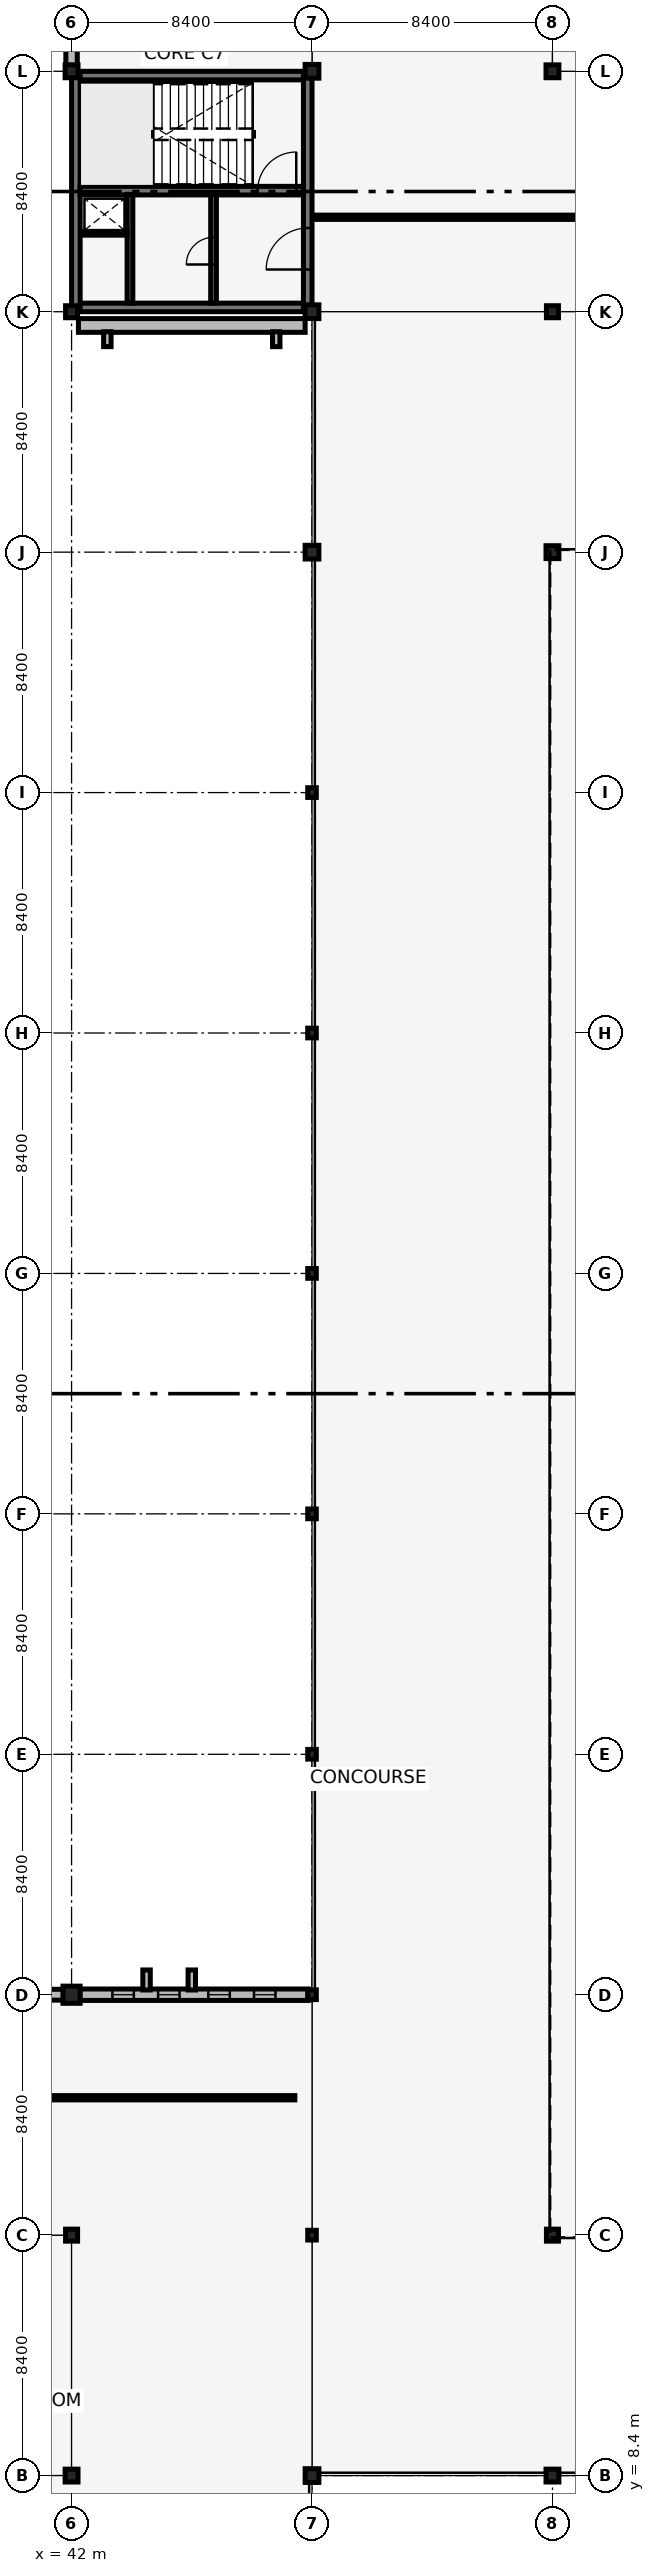
"""IFC4 building model, lengths in metres.
Left out: names, types, materials, properties, quantities, classifications, styles, units other than length and angle.
Written with IfcOpenShell. Run it as: python <this file> out.ifc"""

import sys

from ifc_helpers import new_model, si_unit, direction, frame, frame_2d, origin, origin_2d, place, context, subcontext, project, spatial, rectangle, i_section, extrude, element, fill, save


model = new_model("IFC4")
c1 = context("Model", 3, precision=1e-05, world=origin(), true_north=direction((0.0, 1.0)))
c2 = subcontext(c1, "Body", "Model", "MODEL_VIEW")
j1 = project(units=[si_unit("LENGTHUNIT", "METRE"), si_unit("PLANEANGLEUNIT", "RADIAN")], contexts=[c1])
p1 = place(None, origin())
s1 = spatial("IfcSite", under=j1, at=p1, CompositionType="ELEMENT")
p2 = place(p1, origin())
s2 = spatial("IfcBuilding", under=s1, at=p2, CompositionType="ELEMENT")
p3 = place(p2, frame((0.0, 0.0, 5.44)))
s3 = spatial("IfcBuildingStorey", under=s2, at=p3, CompositionType="ELEMENT", Elevation=5.44)
for number, where, z_axis, x_axis in (
    (1, (42.15, 84.15, 0.0), (0.0, 0.0, 1.0), (1.0, 0.0, 0.0)),
    (2, (42.15, 92.25, 0.0), (0.0, 0.0, 1.0), (1.0, 0.0, 0.0)),
    (3, (42.15, 84.15, 0.0), (0.0, 0.0, 1.0), (0.0, 1.0, 0.0)),
):
    element("IfcWall", number, at=place(p3, frame(where, z_axis=z_axis, x_axis=x_axis)), inside=s3, PredefinedType="SHEAR", context=c2, shape_type="SweptSolid", body=[
        extrude(rectangle(XDim=8.1, YDim=0.3, at=frame_2d((4.05, 0.0))), origin(), (0.0, 0.0, 1.0), 4.12),
    ])
p4 = place(p3, frame((50.25, 84.15, 0.0), z_axis=(0.0, 0.0, 1.0), x_axis=(0.0, 1.0, 0.0)))
e4 = element("IfcWall", 4, at=p4, inside=s3, PredefinedType="SHEAR", context=c2, shape_type="SweptSolid", body=[
    extrude(rectangle(XDim=8.1, YDim=0.3, at=frame_2d((4.05, 0.0))), origin(), (0.0, 0.0, 1.0), 4.12),
])
p5 = place(p4, frame((1.325, 0.0, 0.0)))
e5 = element("IfcOpeningElement", 5, at=p5, cuts=e4, PredefinedType="OPENING", context=c2, shape_type="SweptSolid", body=[
    extrude(rectangle(XDim=1.45, YDim=2.15, at=frame_2d((0.725, 1.075))), frame((0.0, 0.16, 0.0), z_axis=(0.0, -1.0, 0.0), x_axis=(1.0, 0.0, 0.0)), (0.0, 0.0, 1.0), 0.32),
])
p6 = place(p3, frame((42.3, 88.23, 0.0), z_axis=(0.0, 0.0, 1.0), x_axis=(1.0, 0.0, 0.0)))
e6 = element("IfcWall", 6, at=p6, inside=s3, PredefinedType="SHEAR", context=c2, shape_type="SweptSolid", body=[
    extrude(rectangle(XDim=7.8, YDim=0.3, at=frame_2d((3.9, 0.0))), origin(), (0.0, 0.0, 1.0), 4.12),
])
p7 = place(p6, frame((6.2, 0.0, 0.0)))
e7 = element("IfcOpeningElement", 7, at=p7, cuts=e6, PredefinedType="OPENING", context=c2, shape_type="SweptSolid", body=[
    extrude(rectangle(XDim=1.35, YDim=2.15, at=frame_2d((0.675, 1.075))), frame((0.0, 0.16, 0.0), z_axis=(0.0, -1.0, 0.0), x_axis=(1.0, 0.0, 0.0)), (0.0, 0.0, 1.0), 0.32),
])
p8 = place(p3, frame((42.0, 8.4, 0.0), z_axis=(0.0, 0.0, 1.0), x_axis=(1.0, 0.0, 0.0)))
e8 = element("IfcColumn", 8, at=p8, inside=s3, PredefinedType="COLUMN", context=c2, shape_type="SweptSolid", body=[
    extrude(rectangle(XDim=0.45, YDim=0.45, at=origin_2d()), origin(), (0.0, 0.0, 1.0), 4.12),
])
p9 = place(p3, frame((42.0, 16.8, 0.0), z_axis=(0.0, 0.0, 1.0), x_axis=(1.0, 0.0, 0.0)))
e9 = element("IfcColumn", 9, at=p9, inside=s3, PredefinedType="COLUMN", context=c2, shape_type="SweptSolid", body=[
    extrude(rectangle(XDim=0.42, YDim=0.42, at=origin_2d()), origin(), (0.0, 0.0, 1.0), 4.12),
])
p10 = place(p3, frame((42.0, 25.2, 0.0), z_axis=(0.0, 0.0, 1.0), x_axis=(1.0, 0.0, 0.0)))
e10 = element("IfcColumn", 10, at=p10, inside=s3, PredefinedType="COLUMN", context=c2, shape_type="SweptSolid", body=[
    extrude(rectangle(XDim=0.6, YDim=0.6, at=origin_2d()), origin(), (0.0, 0.0, 1.0), 4.12),
])
p11 = place(p3, frame((42.0, 84.0, 0.0), z_axis=(0.0, 0.0, 1.0), x_axis=(1.0, 0.0, 0.0)))
e11 = element("IfcColumn", 11, at=p11, inside=s3, PredefinedType="COLUMN", context=c2, shape_type="SweptSolid", body=[
    extrude(rectangle(XDim=0.42, YDim=0.42, at=origin_2d()), origin(), (0.0, 0.0, 1.0), 4.12),
])
p12 = place(p3, frame((42.0, 92.4, 0.0), z_axis=(0.0, 0.0, 1.0), x_axis=(1.0, 0.0, 0.0)))
e12 = element("IfcColumn", 12, at=p12, inside=s3, PredefinedType="COLUMN", context=c2, shape_type="SweptSolid", body=[
    extrude(rectangle(XDim=0.45, YDim=0.45, at=origin_2d()), origin(), (0.0, 0.0, 1.0), 4.12),
])
p13 = place(p3, frame((50.4, 8.4, 0.0), z_axis=(0.0, 0.0, 1.0), x_axis=(1.0, 0.0, 0.0)))
e13 = element("IfcColumn", 13, at=p13, inside=s3, PredefinedType="COLUMN", context=c2, shape_type="SweptSolid", body=[
    extrude(rectangle(XDim=0.48, YDim=0.48, at=origin_2d()), origin(), (0.0, 0.0, 1.0), 4.12),
])
for number, where, z_axis, x_axis in (
    (14, (50.4, 16.8, 0.0), (0.0, 0.0, 1.0), (1.0, 0.0, 0.0)),
    (15, (50.4, 25.2, 0.0), (0.0, 0.0, 1.0), (1.0, 0.0, 0.0)),
    (16, (50.4, 33.6, 0.0), (0.0, 0.0, 1.0), (1.0, 0.0, 0.0)),
    (17, (50.4, 42.0, 0.0), (0.0, 0.0, 1.0), (1.0, 0.0, 0.0)),
    (18, (50.4, 50.4, 0.0), (0.0, 0.0, 1.0), (1.0, 0.0, 0.0)),
    (19, (50.4, 58.8, 0.0), (0.0, 0.0, 1.0), (1.0, 0.0, 0.0)),
    (20, (50.4, 67.2, 0.0), (0.0, 0.0, 1.0), (1.0, 0.0, 0.0)),
):
    element("IfcColumn", number, at=place(p3, frame(where, z_axis=z_axis, x_axis=x_axis)), inside=s3, PredefinedType="COLUMN", context=c2, shape_type="SweptSolid", body=[
        extrude(i_section(OverallWidth=0.3, OverallDepth=0.34, WebThickness=0.012, FlangeThickness=0.021, FilletRadius=0.027, at=origin_2d()), origin(), (0.0, 0.0, 1.0), 4.12),
    ])
for number, where, z_axis, x_axis in (
    (21, (50.4, 75.6, 0.0), (0.0, 0.0, 1.0), (1.0, 0.0, 0.0)),
    (22, (50.4, 84.0, 0.0), (0.0, 0.0, 1.0), (1.0, 0.0, 0.0)),
    (23, (50.4, 92.4, 0.0), (0.0, 0.0, 1.0), (1.0, 0.0, 0.0)),
):
    element("IfcColumn", number, at=place(p3, frame(where, z_axis=z_axis, x_axis=x_axis)), inside=s3, PredefinedType="COLUMN", context=c2, shape_type="SweptSolid", body=[
        extrude(rectangle(XDim=0.48, YDim=0.48, at=origin_2d()), origin(), (0.0, 0.0, 1.0), 4.12),
    ])
p14 = place(p3, frame((58.8, 8.4, 0.0), z_axis=(0.0, 0.0, 1.0), x_axis=(1.0, 0.0, 0.0)))
e24 = element("IfcColumn", 24, at=p14, inside=s3, PredefinedType="COLUMN", context=c2, shape_type="SweptSolid", body=[
    extrude(rectangle(XDim=0.45, YDim=0.45, at=origin_2d()), origin(), (0.0, 0.0, 1.0), 4.12),
])
p15 = place(p3, frame((58.8, 16.8, 0.0), z_axis=(0.0, 0.0, 1.0), x_axis=(1.0, 0.0, 0.0)))
e25 = element("IfcColumn", 25, at=p15, inside=s3, PredefinedType="COLUMN", context=c2, shape_type="SweptSolid", body=[
    extrude(rectangle(XDim=0.42, YDim=0.42, at=origin_2d()), origin(), (0.0, 0.0, 1.0), 4.12),
])
p16 = place(p3, frame((58.8, 75.6, 0.0), z_axis=(0.0, 0.0, 1.0), x_axis=(1.0, 0.0, 0.0)))
e26 = element("IfcColumn", 26, at=p16, inside=s3, PredefinedType="COLUMN", context=c2, shape_type="SweptSolid", body=[
    extrude(rectangle(XDim=0.45, YDim=0.45, at=origin_2d()), origin(), (0.0, 0.0, 1.0), 4.12),
])
p17 = place(p3, frame((58.8, 84.0, 0.0), z_axis=(0.0, 0.0, 1.0), x_axis=(1.0, 0.0, 0.0)))
e27 = element("IfcColumn", 27, at=p17, inside=s3, PredefinedType="COLUMN", context=c2, shape_type="SweptSolid", body=[
    extrude(rectangle(XDim=0.42, YDim=0.42, at=origin_2d()), origin(), (0.0, 0.0, 1.0), 4.12),
])
p18 = place(p3, frame((58.8, 92.4, 0.0), z_axis=(0.0, 0.0, 1.0), x_axis=(1.0, 0.0, 0.0)))
e28 = element("IfcColumn", 28, at=p18, inside=s3, PredefinedType="COLUMN", context=c2, shape_type="SweptSolid", body=[
    extrude(rectangle(XDim=0.45, YDim=0.45, at=origin_2d()), origin(), (0.0, 0.0, 1.0), 4.12),
])
p19 = place(p3, frame((33.885, 25.2, 0.0), z_axis=(0.0, 0.0, 1.0), x_axis=(1.0, 0.0, 0.0)))
e29 = element("IfcWall", 29, at=p19, inside=s3, PredefinedType="SOLIDWALL", context=c2, shape_type="SweptSolid", body=[
    extrude(rectangle(XDim=7.83, YDim=0.38, at=frame_2d((3.915, 0.0))), origin(), (0.0, 0.0, 1.0), 3.76),
])
p20 = place(p19, frame((1.148, 0.0, 0.75)))
e30 = element("IfcOpeningElement", 30, at=p20, cuts=e29, PredefinedType="OPENING", context=c2, shape_type="SweptSolid", body=[
    extrude(rectangle(XDim=0.68, YDim=2.3, at=frame_2d((0.34, 1.15))), frame((0.0, 0.2, 0.0), z_axis=(0.0, -1.0, 0.0), x_axis=(1.0, 0.0, 0.0)), (0.0, 0.0, 1.0), 0.4),
])
p21 = place(p19, frame((2.714, 0.0, 0.75)))
e31 = element("IfcOpeningElement", 31, at=p21, cuts=e29, PredefinedType="OPENING", context=c2, shape_type="SweptSolid", body=[
    extrude(rectangle(XDim=0.68, YDim=2.3, at=frame_2d((0.34, 1.15))), frame((0.0, 0.2, 0.0), z_axis=(0.0, -1.0, 0.0), x_axis=(1.0, 0.0, 0.0)), (0.0, 0.0, 1.0), 0.4),
])
p22 = place(p19, frame((4.436, 0.0, 0.75)))
e32 = element("IfcOpeningElement", 32, at=p22, cuts=e29, PredefinedType="OPENING", context=c2, shape_type="SweptSolid", body=[
    extrude(rectangle(XDim=0.68, YDim=2.3, at=frame_2d((0.34, 1.15))), frame((0.0, 0.2, 0.0), z_axis=(0.0, -1.0, 0.0), x_axis=(1.0, 0.0, 0.0)), (0.0, 0.0, 1.0), 0.4),
])
p23 = place(p19, frame((6.002, 0.0, 0.75)))
e33 = element("IfcOpeningElement", 33, at=p23, cuts=e29, PredefinedType="OPENING", context=c2, shape_type="SweptSolid", body=[
    extrude(rectangle(XDim=0.68, YDim=2.3, at=frame_2d((0.34, 1.15))), frame((0.0, 0.2, 0.0), z_axis=(0.0, -1.0, 0.0), x_axis=(1.0, 0.0, 0.0)), (0.0, 0.0, 1.0), 0.4),
])
p24 = place(p3, frame((42.285, 25.2, 0.0), z_axis=(0.0, 0.0, 1.0), x_axis=(1.0, 0.0, 0.0)))
e34 = element("IfcWall", 34, at=p24, inside=s3, PredefinedType="SOLIDWALL", context=c2, shape_type="SweptSolid", body=[
    extrude(rectangle(XDim=7.98, YDim=0.4, at=frame_2d((3.99, 0.0))), origin(), (0.0, 0.0, 1.0), 3.76),
])
p25 = place(p24, frame((1.141, 0.0, 0.75)))
e35 = element("IfcOpeningElement", 35, at=p25, cuts=e34, PredefinedType="OPENING", context=c2, shape_type="SweptSolid", body=[
    extrude(rectangle(XDim=0.75, YDim=2.1, at=frame_2d((0.375, 1.05))), frame((0.0, 0.21, 0.0), z_axis=(0.0, -1.0, 0.0), x_axis=(1.0, 0.0, 0.0)), (0.0, 0.0, 1.0), 0.42),
])
p26 = place(p24, frame((2.737, 0.0, 0.75)))
e36 = element("IfcOpeningElement", 36, at=p26, cuts=e34, PredefinedType="OPENING", context=c2, shape_type="SweptSolid", body=[
    extrude(rectangle(XDim=0.75, YDim=2.1, at=frame_2d((0.375, 1.05))), frame((0.0, 0.21, 0.0), z_axis=(0.0, -1.0, 0.0), x_axis=(1.0, 0.0, 0.0)), (0.0, 0.0, 1.0), 0.42),
])
p27 = place(p24, frame((4.493, 0.0, 0.75)))
e37 = element("IfcOpeningElement", 37, at=p27, cuts=e34, PredefinedType="OPENING", context=c2, shape_type="SweptSolid", body=[
    extrude(rectangle(XDim=0.75, YDim=2.1, at=frame_2d((0.375, 1.05))), frame((0.0, 0.21, 0.0), z_axis=(0.0, -1.0, 0.0), x_axis=(1.0, 0.0, 0.0)), (0.0, 0.0, 1.0), 0.42),
])
p28 = place(p24, frame((6.089, 0.0, 0.75)))
e38 = element("IfcOpeningElement", 38, at=p28, cuts=e34, PredefinedType="OPENING", context=c2, shape_type="SweptSolid", body=[
    extrude(rectangle(XDim=0.75, YDim=2.1, at=frame_2d((0.375, 1.05))), frame((0.0, 0.21, 0.0), z_axis=(0.0, -1.0, 0.0), x_axis=(1.0, 0.0, 0.0)), (0.0, 0.0, 1.0), 0.42),
])
for number, where, z_axis, x_axis in (
    (39, (44.62, 25.365, 0.0), (0.0, 0.0, 1.0), (0.0, 1.0, 0.0)),
    (40, (46.2, 25.365, 0.0), (0.0, 0.0, 1.0), (0.0, 1.0, 0.0)),
):
    element("IfcWall", number, at=place(p3, frame(where, z_axis=z_axis, x_axis=x_axis)), inside=s3, PredefinedType="SOLIDWALL", context=c2, shape_type="SweptSolid", body=[
        extrude(rectangle(XDim=0.7, YDim=0.26, at=frame_2d((0.35, 0.0))), origin(), (0.0, 0.0, 1.0), 4.42),
    ])
p29 = place(p3, frame((42.24, 83.52, 0.0), z_axis=(0.0, 0.0, 1.0), x_axis=(1.0, 0.0, 0.0)))
e41 = element("IfcWall", 41, at=p29, inside=s3, PredefinedType="SOLIDWALL", context=c2, shape_type="SweptSolid", body=[
    extrude(rectangle(XDim=7.92, YDim=0.48, at=frame_2d((3.96, 0.0))), origin(), (0.0, 0.0, 1.0), 4.42),
])
for number, where, z_axis, x_axis in (
    (42, (43.25, 83.3, 0.0), (0.0, 0.0, 1.0), (0.0, -1.0, 0.0)),
    (43, (49.15, 83.3, 0.0), (0.0, 0.0, 1.0), (0.0, -1.0, 0.0)),
):
    element("IfcWall", number, at=place(p3, frame(where, z_axis=z_axis, x_axis=x_axis)), inside=s3, PredefinedType="SOLIDWALL", context=c2, shape_type="SweptSolid", body=[
        extrude(rectangle(XDim=0.52, YDim=0.26, at=frame_2d((0.26, 0.0))), origin(), (0.0, 0.0, 1.0), 4.42),
    ])
p30 = place(p3, frame((42.0, 92.61, 0.0), z_axis=(0.0, 0.0, 1.0), x_axis=(0.0, 1.0, 0.0)))
e44 = element("IfcWall", 44, at=p30, inside=s3, PredefinedType="SOLIDWALL", context=c2, shape_type="SweptSolid", body=[
    extrude(rectangle(XDim=7.995, YDim=0.4, at=frame_2d((3.998, 0.0))), origin(), (0.0, 0.0, 1.0), 3.37),
])
p31 = place(p30, frame((1.144, 0.0, 0.7)))
e45 = element("IfcOpeningElement", 45, at=p31, cuts=e44, PredefinedType="OPENING", context=c2, shape_type="SweptSolid", body=[
    extrude(rectangle(XDim=0.75, YDim=2.1, at=frame_2d((0.375, 1.05))), frame((0.0, 0.21, 0.0), z_axis=(0.0, -1.0, 0.0), x_axis=(1.0, 0.0, 0.0)), (0.0, 0.0, 1.0), 0.42),
])
p32 = place(p30, frame((2.743, 0.0, 0.7)))
e46 = element("IfcOpeningElement", 46, at=p32, cuts=e44, PredefinedType="OPENING", context=c2, shape_type="SweptSolid", body=[
    extrude(rectangle(XDim=0.75, YDim=2.1, at=frame_2d((0.375, 1.05))), frame((0.0, 0.21, 0.0), z_axis=(0.0, -1.0, 0.0), x_axis=(1.0, 0.0, 0.0)), (0.0, 0.0, 1.0), 0.42),
])
p33 = place(p30, frame((4.502, 0.0, 0.7)))
e47 = element("IfcOpeningElement", 47, at=p33, cuts=e44, PredefinedType="OPENING", context=c2, shape_type="SweptSolid", body=[
    extrude(rectangle(XDim=0.75, YDim=2.1, at=frame_2d((0.375, 1.05))), frame((0.0, 0.21, 0.0), z_axis=(0.0, -1.0, 0.0), x_axis=(1.0, 0.0, 0.0)), (0.0, 0.0, 1.0), 0.42),
])
p34 = place(p30, frame((6.101, 0.0, 0.7)))
e48 = element("IfcOpeningElement", 48, at=p34, cuts=e44, PredefinedType="OPENING", context=c2, shape_type="SweptSolid", body=[
    extrude(rectangle(XDim=0.75, YDim=2.1, at=frame_2d((0.375, 1.05))), frame((0.0, 0.21, 0.0), z_axis=(0.0, -1.0, 0.0), x_axis=(1.0, 0.0, 0.0)), (0.0, 0.0, 1.0), 0.42),
])
p35 = place(p3, frame((46.96, 84.3, 0.0), z_axis=(0.0, 0.0, 1.0), x_axis=(0.0, 1.0, 0.0)))
e49 = element("IfcWall", 49, at=p35, inside=s3, PredefinedType="SHEAR", context=c2, shape_type="SweptSolid", body=[
    extrude(rectangle(XDim=3.8, YDim=0.2, at=frame_2d((1.9, 0.0))), origin(), (0.0, 0.0, 1.0), 3.38),
])
p36 = place(p35, frame((1.35, 0.0, 0.0)))
e50 = element("IfcOpeningElement", 50, at=p36, cuts=e49, PredefinedType="OPENING", context=c2, shape_type="SweptSolid", body=[
    extrude(rectangle(XDim=0.95, YDim=2.1, at=frame_2d((0.475, 1.05))), frame((0.0, 0.11, 0.0), z_axis=(0.0, -1.0, 0.0), x_axis=(1.0, 0.0, 0.0)), (0.0, 0.0, 1.0), 0.22),
])
p37 = place(p3, frame((44.04, 84.3, 0.0), z_axis=(0.0, 0.0, 1.0), x_axis=(0.0, 1.0, 0.0)))
e51 = element("IfcWall", 51, at=p37, inside=s3, PredefinedType="SHEAR", context=c2, shape_type="SweptSolid", body=[
    extrude(rectangle(XDim=3.8, YDim=0.2, at=frame_2d((1.9, 0.0))), origin(), (0.0, 0.0, 1.0), 3.38),
])
p38 = place(p3, frame((42.32, 86.74, 0.0), z_axis=(0.0, 0.0, 1.0), x_axis=(1.0, 0.0, 0.0)))
e52 = element("IfcWall", 52, at=p38, inside=s3, PredefinedType="PARTITIONING", context=c2, shape_type="SweptSolid", body=[
    extrude(rectangle(XDim=1.62, YDim=0.13, at=frame_2d((0.81, 0.0))), origin(), (0.0, 0.0, 1.0), 3.37),
])
p39 = place(p3, frame((29.28, 21.6, 0.0), z_axis=(0.0, 0.0, 1.0), x_axis=(1.0, 0.0, 0.0)))
e53 = element("IfcWall", 53, at=p39, inside=s3, PredefinedType="PARTITIONING", context=c2, shape_type="SweptSolid", body=[
    extrude(rectangle(XDim=20.52, YDim=0.15, at=frame_2d((10.26, 0.0))), origin(), (0.0, 0.0, 1.0), 4.12),
])
p40 = place(p39, frame((9.735, 0.0, 0.0)))
e54 = element("IfcOpeningElement", 54, at=p40, cuts=e53, PredefinedType="OPENING", context=c2, shape_type="SweptSolid", body=[
    extrude(rectangle(XDim=1.05, YDim=2.15, at=frame_2d((0.525, 1.075))), frame((0.0, 0.085, 0.0), z_axis=(0.0, -1.0, 0.0), x_axis=(1.0, 0.0, 0.0)), (0.0, 0.0, 1.0), 0.17),
])
p41 = place(p3, frame((50.43, 87.3, 0.0), z_axis=(0.0, 0.0, 1.0), x_axis=(1.0, 0.0, 0.0)))
e55 = element("IfcWall", 55, at=p41, inside=s3, PredefinedType="PARTITIONING", context=c2, shape_type="SweptSolid", body=[
    extrude(rectangle(XDim=24.82, YDim=0.15, at=frame_2d((12.41, 0.0))), origin(), (0.0, 0.0, 1.0), 3.47),
])
p42 = place(p41, frame((11.885, 0.0, 0.0)))
e56 = element("IfcOpeningElement", 56, at=p42, cuts=e55, PredefinedType="OPENING", context=c2, shape_type="SweptSolid", body=[
    extrude(rectangle(XDim=1.05, YDim=2.15, at=frame_2d((0.525, 1.075))), frame((0.0, 0.085, 0.0), z_axis=(0.0, -1.0, 0.0), x_axis=(1.0, 0.0, 0.0)), (0.0, 0.0, 1.0), 0.17),
])
p43 = place(p25, origin())
e57 = element("IfcWindow", 57, at=p43, inside=s3, PartitioningType="DOUBLE_PANEL_VERTICAL", PredefinedType="WINDOW", context=c2, shape_type="SweptSolid", body=[
    extrude(rectangle(XDim=0.75, YDim=2.1, at=frame_2d((0.375, 1.05))), frame((0.0, 0.03, 0.0), z_axis=(0.0, -1.0, 0.0), x_axis=(1.0, 0.0, 0.0)), (0.0, 0.0, 1.0), 0.06),
])
fill(e35, e57)
p44 = place(p26, origin())
e58 = element("IfcWindow", 58, at=p44, inside=s3, PartitioningType="DOUBLE_PANEL_VERTICAL", PredefinedType="WINDOW", context=c2, shape_type="SweptSolid", body=[
    extrude(rectangle(XDim=0.75, YDim=2.1, at=frame_2d((0.375, 1.05))), frame((0.0, 0.03, 0.0), z_axis=(0.0, -1.0, 0.0), x_axis=(1.0, 0.0, 0.0)), (0.0, 0.0, 1.0), 0.06),
])
fill(e36, e58)
p45 = place(p27, origin())
e59 = element("IfcWindow", 59, at=p45, inside=s3, PartitioningType="DOUBLE_PANEL_VERTICAL", PredefinedType="WINDOW", context=c2, shape_type="SweptSolid", body=[
    extrude(rectangle(XDim=0.75, YDim=2.1, at=frame_2d((0.375, 1.05))), frame((0.0, 0.03, 0.0), z_axis=(0.0, -1.0, 0.0), x_axis=(1.0, 0.0, 0.0)), (0.0, 0.0, 1.0), 0.06),
])
fill(e37, e59)
p46 = place(p28, origin())
e60 = element("IfcWindow", 60, at=p46, inside=s3, PartitioningType="DOUBLE_PANEL_VERTICAL", PredefinedType="WINDOW", context=c2, shape_type="SweptSolid", body=[
    extrude(rectangle(XDim=0.75, YDim=2.1, at=frame_2d((0.375, 1.05))), frame((0.0, 0.03, 0.0), z_axis=(0.0, -1.0, 0.0), x_axis=(1.0, 0.0, 0.0)), (0.0, 0.0, 1.0), 0.06),
])
fill(e38, e60)
p47 = place(p7, origin())
e61 = element("IfcDoor", 61, at=p47, inside=s3, OperationType="SINGLE_SWING_RIGHT", PredefinedType="DOOR", context=c2, shape_type="SweptSolid", body=[
    extrude(rectangle(XDim=1.35, YDim=2.15, at=frame_2d((0.675, 1.075))), frame((0.0, 0.025, 0.0), z_axis=(0.0, -1.0, 0.0), x_axis=(1.0, 0.0, 0.0)), (0.0, 0.0, 1.0), 0.05),
])
fill(e7, e61)
p48 = place(p36, origin())
e62 = element("IfcDoor", 62, at=p48, inside=s3, OperationType="SINGLE_SWING_LEFT", PredefinedType="DOOR", context=c2, shape_type="SweptSolid", body=[
    extrude(rectangle(XDim=0.95, YDim=2.1, at=frame_2d((0.475, 1.05))), frame((0.0, 0.025, 0.0), z_axis=(0.0, -1.0, 0.0), x_axis=(1.0, 0.0, 0.0)), (0.0, 0.0, 1.0), 0.05),
])
fill(e50, e62)
p49 = place(p5, origin())
e63 = element("IfcDoor", 63, at=p49, inside=s3, OperationType="DOUBLE_DOOR_SINGLE_SWING", PredefinedType="DOOR", context=c2, shape_type="SweptSolid", body=[
    extrude(rectangle(XDim=1.45, YDim=2.15, at=frame_2d((0.725, 1.075))), frame((0.0, 0.025, 0.0), z_axis=(0.0, -1.0, 0.0), x_axis=(1.0, 0.0, 0.0)), (0.0, 0.0, 1.0), 0.05),
])
fill(e5, e63)
save(model, sys.argv[1])
